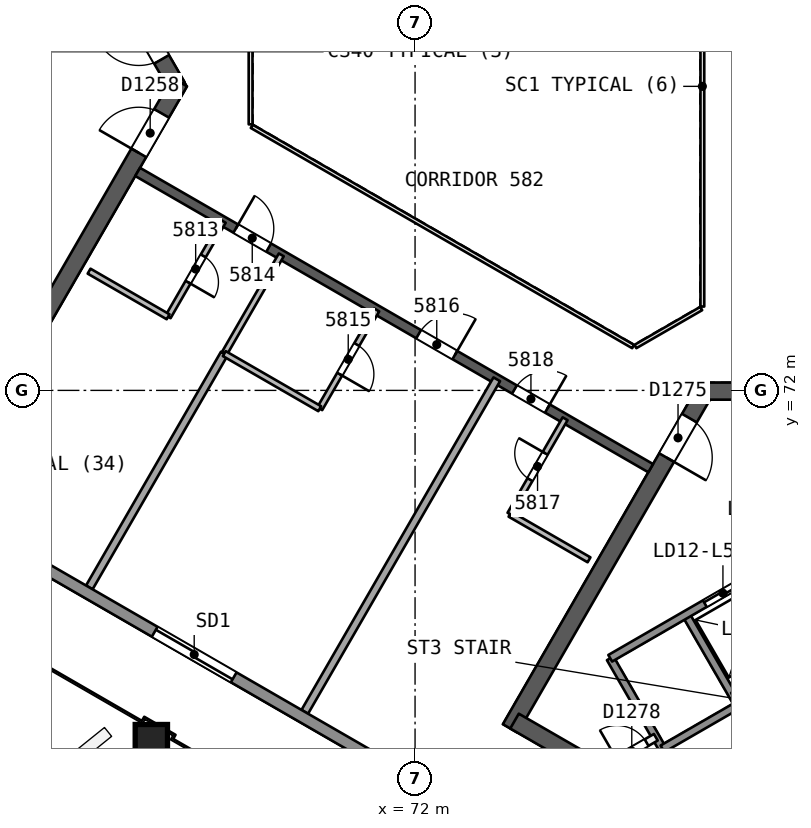
"""IFC4 building model, lengths in metres.
Left out: names, types, materials, properties, quantities, classifications, styles, units other than length and angle.
Written with IfcOpenShell. Run it as: python <this file> out.ifc"""

import sys

from ifc_helpers import new_model, si_unit, direction, frame, frame_2d, origin, origin_2d, place, context, subcontext, project, spatial, rectangle, extrude, element, fill, save


model = new_model("IFC4")
c1 = context("Model", 3, precision=1e-05, world=origin(), true_north=direction((0.0, 1.0)))
c2 = subcontext(c1, "Body", "Model", "MODEL_VIEW")
j1 = project(units=[si_unit("LENGTHUNIT", "METRE"), si_unit("PLANEANGLEUNIT", "RADIAN")], contexts=[c1])
p1 = place(None, origin())
s1 = spatial("IfcSite", under=j1, at=p1, CompositionType="ELEMENT")
p2 = place(p1, origin())
s2 = spatial("IfcBuilding", under=s1, at=p2, CompositionType="ELEMENT")
p3 = place(p2, frame((0.0, 0.0, 235.4)))
s3 = spatial("IfcBuildingStorey", under=s2, at=p3, CompositionType="ELEMENT", Elevation=235.4)
p4 = place(p3, frame((65.74, 80.0, 0.0), z_axis=(0.0, 0.0, 1.0), x_axis=(-0.499991857942, 0.866030104553, 0.0)))
e1 = element("IfcWall", 1, at=p4, inside=s3, PredefinedType="SHEAR", context=c2, shape_type="SweptSolid", body=[
    extrude(rectangle(XDim=10.25, YDim=0.45, at=frame_2d((5.125, 0.0))), origin(), (0.0, 0.0, 1.0), 3.7),
])
p5 = place(p4, frame((0.82, 0.0, 0.0)))
e2 = element("IfcOpeningElement", 2, at=p5, cuts=e1, PredefinedType="OPENING", context=c2, shape_type="SweptSolid", body=[
    extrude(rectangle(XDim=1.2, YDim=2.1, at=frame_2d((0.6, 1.05))), frame((0.0, 0.235, 0.0), z_axis=(0.0, -1.0, 0.0), x_axis=(1.0, 0.0, 0.0)), (0.0, 0.0, 1.0), 0.471),
])
p6 = place(p3, frame((60.728, 71.318, 0.0), z_axis=(0.0, 0.0, 1.0), x_axis=(0.500012416173, 0.866018235185, 0.0)))
e3 = element("IfcWall", 3, at=p6, inside=s3, PredefinedType="SHEAR", context=c2, shape_type="SweptSolid", body=[
    extrude(rectangle(XDim=10.155, YDim=0.45, at=frame_2d((5.078, 0.0))), origin(), (0.0, 0.0, 1.0), 3.7),
])
p7 = place(p6, frame((8.005, 0.0, 0.0)))
e4 = element("IfcOpeningElement", 4, at=p7, cuts=e3, PredefinedType="OPENING", context=c2, shape_type="SweptSolid", body=[
    extrude(rectangle(XDim=1.2, YDim=2.1, at=frame_2d((0.6, 1.05))), frame((0.0, 0.235, 0.0), z_axis=(0.0, -1.0, 0.0), x_axis=(1.0, 0.0, 0.0)), (0.0, 0.0, 1.0), 0.471),
])
p8 = place(p3, frame((79.63, 71.981, 0.0), z_axis=(0.0, 0.0, 1.0), x_axis=(-0.500002171595, -0.86602415001, 0.0)))
e5 = element("IfcWall", 5, at=p8, inside=s3, PredefinedType="SHEAR", context=c2, shape_type="SweptSolid", body=[
    extrude(rectangle(XDim=10.25, YDim=0.45, at=frame_2d((5.125, 0.0))), origin(), (0.0, 0.0, 1.0), 3.7),
])
p9 = place(p8, frame((0.82, 0.0, 0.0)))
e6 = element("IfcOpeningElement", 6, at=p9, cuts=e5, PredefinedType="OPENING", context=c2, shape_type="SweptSolid", body=[
    extrude(rectangle(XDim=1.2, YDim=2.1, at=frame_2d((0.6, 1.05))), frame((0.0, 0.235, 0.0), z_axis=(0.0, -1.0, 0.0), x_axis=(1.0, 0.0, 0.0)), (0.0, 0.0, 1.0), 0.471),
])
p10 = place(p3, frame((74.617, 63.299, 0.0), z_axis=(0.0, 0.0, 1.0), x_axis=(0.86602594008, -0.499999071108, 0.0)))
e7 = element("IfcWall", 7, at=p10, inside=s3, PredefinedType="SHEAR", context=c2, shape_type="SweptSolid", body=[
    extrude(rectangle(XDim=14.108, YDim=0.45, at=frame_2d((7.054, 0.0))), origin(), (0.0, 0.0, 1.0), 3.7),
])
p11 = place(p3, frame((89.655, 71.981, 0.0), z_axis=(0.0, 0.0, 1.0), x_axis=(-1.0, 0.0, 0.0)))
e8 = element("IfcWall", 8, at=p11, inside=s3, PredefinedType="SHEAR", context=c2, shape_type="SweptSolid", body=[
    extrude(rectangle(XDim=10.155, YDim=0.45, at=frame_2d((5.078, 0.0))), origin(), (0.0, 0.0, 1.0), 3.7),
])
p12 = place(p11, frame((8.005, 0.0, 0.0)))
e9 = element("IfcOpeningElement", 9, at=p12, cuts=e8, PredefinedType="OPENING", context=c2, shape_type="SweptSolid", body=[
    extrude(rectangle(XDim=1.2, YDim=2.1, at=frame_2d((0.6, 1.05))), frame((0.0, 0.235, 0.0), z_axis=(0.0, -1.0, 0.0), x_axis=(1.0, 0.0, 0.0)), (0.0, 0.0, 1.0), 0.471),
])
p13 = place(p3, frame((64.7, 77.748, 0.0), z_axis=(0.0, 0.0, 1.0), x_axis=(0.866026492143, -0.499998114903, 0.0)))
e10 = element("IfcWall", 10, at=p13, inside=s3, PredefinedType="SHEAR", context=c2, shape_type="SweptSolid", body=[
    extrude(rectangle(XDim=15.588, YDim=0.25, at=frame_2d((7.794, 0.0))), origin(), (0.0, 0.0, 1.0), 3.3),
])
p14 = place(p13, frame((2.982, 0.0, 0.0)))
e11 = element("IfcOpeningElement", 11, at=p14, cuts=e10, PredefinedType="OPENING", context=c2, shape_type="SweptSolid", body=[
    extrude(rectangle(XDim=1.0, YDim=2.1, at=frame_2d((0.5, 1.05))), frame((0.0, 0.135, 0.0), z_axis=(0.0, -1.0, 0.0), x_axis=(1.0, 0.0, 0.0)), (0.0, 0.0, 1.0), 0.271),
])
p15 = place(p13, frame((8.538, 0.0, 0.0)))
e12 = element("IfcOpeningElement", 12, at=p15, cuts=e10, PredefinedType="OPENING", context=c2, shape_type="SweptSolid", body=[
    extrude(rectangle(XDim=1.1, YDim=2.1, at=frame_2d((0.55, 1.05))), frame((0.0, 0.135, 0.0), z_axis=(0.0, -1.0, 0.0), x_axis=(1.0, 0.0, 0.0)), (0.0, 0.0, 1.0), 0.271),
])
p16 = place(p13, frame((11.45, 0.0, 0.0)))
e13 = element("IfcOpeningElement", 13, at=p16, cuts=e10, PredefinedType="OPENING", context=c2, shape_type="SweptSolid", body=[
    extrude(rectangle(XDim=1.0, YDim=2.1, at=frame_2d((0.5, 1.05))), frame((0.0, 0.135, 0.0), z_axis=(0.0, -1.0, 0.0), x_axis=(1.0, 0.0, 0.0)), (0.0, 0.0, 1.0), 0.271),
])
p17 = place(p3, frame((65.048, 62.763, 0.0), z_axis=(0.010092954999, 0.017481261926, 0.999796248113), x_axis=(-0.866025993948, 0.499998977805, 1.48321e-07)))
e14 = element("IfcColumn", 14, at=p17, inside=s3, PredefinedType="COLUMN", context=c2, shape_type="SweptSolid", body=[
    extrude(rectangle(XDim=0.85, YDim=0.85, at=origin_2d()), origin(), (0.0, 0.0, 1.0), 3.701),
])
p18 = place(p3, frame((66.952, 76.448, 0.0), z_axis=(0.0, 0.0, 1.0), x_axis=(-0.499987231761, -0.866032775405, 0.0)))
e15 = element("IfcWall", 15, at=p18, inside=s3, PredefinedType="PARTITIONING", context=c2, shape_type="SweptSolid", body=[
    extrude(rectangle(XDim=2.9, YDim=0.15, at=frame_2d((1.45, 0.0))), origin(), (0.0, 0.0, 1.0), 3.3),
])
p19 = place(p18, frame((1.05, 0.0, 0.0)))
e16 = element("IfcOpeningElement", 16, at=p19, cuts=e15, PredefinedType="OPENING", context=c2, shape_type="SweptSolid", body=[
    extrude(rectangle(XDim=0.8, YDim=2.1, at=frame_2d((0.4, 1.05))), frame((0.0, 0.085, 0.0), z_axis=(0.0, -1.0, 0.0), x_axis=(1.0, 0.0, 0.0)), (0.0, 0.0, 1.0), 0.171),
])
p20 = place(p3, frame((65.502, 73.937, 0.0), z_axis=(0.0, 0.0, 1.0), x_axis=(-0.865994240961, 0.500053971709, 0.0)))
e17 = element("IfcWall", 17, at=p20, inside=s3, PredefinedType="PARTITIONING", context=c2, shape_type="SweptSolid", body=[
    extrude(rectangle(XDim=2.401, YDim=0.15, at=frame_2d((1.201, 0.0))), origin(), (0.0, 0.0, 1.0), 3.3),
])
p21 = place(p3, frame((63.428, 66.815, 0.0), z_axis=(0.0, 0.0, 1.0), x_axis=(0.499994154718, 0.866028778533, 0.0)))
e18 = element("IfcWall", 18, at=p21, inside=s3, PredefinedType="PARTITIONING", context=c2, shape_type="SweptSolid", body=[
    extrude(rectangle(XDim=7.104, YDim=0.2, at=frame_2d((3.552, 0.0))), origin(), (0.0, 0.0, 1.0), 3.3),
])
p22 = place(p3, frame((66.98, 72.968, 0.0), z_axis=(0.0, 0.0, 1.0), x_axis=(0.499990139034, 0.866031096941, 0.0)))
e19 = element("IfcWall", 19, at=p22, inside=s3, PredefinedType="PARTITIONING", context=c2, shape_type="SweptSolid", body=[
    extrude(rectangle(XDim=3.0, YDim=0.15, at=frame_2d((1.5, 0.0))), origin(), (0.0, 0.0, 1.0), 3.3),
])
p23 = place(p3, frame((70.991, 74.116, 0.0), z_axis=(0.0, 0.0, 1.0), x_axis=(-0.499990139034, -0.866031096941, 0.0)))
e20 = element("IfcWall", 20, at=p23, inside=s3, PredefinedType="PARTITIONING", context=c2, shape_type="SweptSolid", body=[
    extrude(rectangle(XDim=3.0, YDim=0.15, at=frame_2d((1.5, 0.0))), origin(), (0.0, 0.0, 1.0), 3.3),
])
p24 = place(p23, frame((1.05, 0.0, 0.0)))
e21 = element("IfcOpeningElement", 21, at=p24, cuts=e20, PredefinedType="OPENING", context=c2, shape_type="SweptSolid", body=[
    extrude(rectangle(XDim=0.9, YDim=2.1, at=frame_2d((0.45, 1.05))), frame((0.0, 0.085, 0.0), z_axis=(0.0, -1.0, 0.0), x_axis=(1.0, 0.0, 0.0)), (0.0, 0.0, 1.0), 0.171),
])
p25 = place(p3, frame((69.491, 71.518, 0.0), z_axis=(0.0, 0.0, 1.0), x_axis=(-0.866032775405, 0.499987231761, 0.0)))
e22 = element("IfcWall", 22, at=p25, inside=s3, PredefinedType="PARTITIONING", context=c2, shape_type="SweptSolid", body=[
    extrude(rectangle(XDim=2.9, YDim=0.15, at=frame_2d((1.45, 0.0))), origin(), (0.0, 0.0, 1.0), 3.3),
])
p26 = place(p3, frame((69.098, 63.542, 0.0), z_axis=(0.0, 0.0, 1.0), x_axis=(0.499992962407, 0.866029466902, 0.0)))
e23 = element("IfcWall", 23, at=p26, inside=s3, PredefinedType="PARTITIONING", context=c2, shape_type="SweptSolid", body=[
    extrude(rectangle(XDim=10.104, YDim=0.2, at=frame_2d((5.052, 0.0))), origin(), (0.0, 0.0, 1.0), 3.3),
])
p27 = place(p3, frame((76.578, 67.542, 0.0), z_axis=(0.0, 0.0, 1.0), x_axis=(-0.866038271014, 0.499977712642, 0.0)))
e24 = element("IfcWall", 24, at=p27, inside=s3, PredefinedType="PARTITIONING", context=c2, shape_type="SweptSolid", body=[
    extrude(rectangle(XDim=2.401, YDim=0.15, at=frame_2d((1.2, 0.0))), origin(), (0.0, 0.0, 1.0), 3.3),
])
p28 = place(p3, frame((74.498, 68.743, 0.0), z_axis=(0.0, 0.0, 1.0), x_axis=(0.499987231761, 0.866032775405, 0.0)))
e25 = element("IfcWall", 25, at=p28, inside=s3, PredefinedType="PARTITIONING", context=c2, shape_type="SweptSolid", body=[
    extrude(rectangle(XDim=2.9, YDim=0.15, at=frame_2d((1.45, 0.0))), origin(), (0.0, 0.0, 1.0), 3.3),
])
p29 = place(p28, frame((1.05, 0.0, 0.0)))
e26 = element("IfcOpeningElement", 26, at=p29, cuts=e25, PredefinedType="OPENING", context=c2, shape_type="SweptSolid", body=[
    extrude(rectangle(XDim=0.8, YDim=2.1, at=frame_2d((0.4, 1.05))), frame((0.0, 0.085, 0.0), z_axis=(0.0, -1.0, 0.0), x_axis=(1.0, 0.0, 0.0)), (0.0, 0.0, 1.0), 0.171),
])
p30 = place(p3, frame((87.932, 52.496, 0.0), z_axis=(0.0, 0.0, 1.0), x_axis=(-0.866025334516, 0.500000119977, 0.0)))
e27 = element("IfcWall", 27, at=p30, inside=s3, PredefinedType="SOLIDWALL", context=c2, shape_type="SweptSolid", body=[
    extrude(rectangle(XDim=49.903, YDim=0.3, at=frame_2d((24.952, 0.0))), origin(), (0.0, 0.0, 1.0), 3.3),
])
p31 = place(p30, frame((23.907, 0.0, 0.0)))
e28 = element("IfcOpeningElement", 28, at=p31, cuts=e27, PredefinedType="OPENING", context=c2, shape_type="SweptSolid", body=[
    extrude(rectangle(XDim=2.4, YDim=2.4, at=frame_2d((1.2, 1.2))), frame((0.0, 0.161, 0.0), z_axis=(0.0, -1.0, 0.0), x_axis=(1.0, 0.0, 0.0)), (0.0, 0.0, 1.0), 0.321),
])
p32 = place(p30, frame((37.985, 0.0, 0.0)))
e29 = element("IfcOpeningElement", 29, at=p32, cuts=e27, PredefinedType="OPENING", context=c2, shape_type="SweptSolid", body=[
    extrude(rectangle(XDim=2.4, YDim=2.4, at=frame_2d((1.2, 1.2))), frame((0.0, 0.161, 0.0), z_axis=(0.0, -1.0, 0.0), x_axis=(1.0, 0.0, 0.0)), (0.0, 0.0, 1.0), 0.321),
])
p33 = place(p30, frame((9.674, 0.0, 0.0)))
e30 = element("IfcOpeningElement", 30, at=p33, cuts=e27, PredefinedType="OPENING", context=c2, shape_type="SweptSolid", body=[
    extrude(rectangle(XDim=2.4, YDim=2.4, at=frame_2d((1.2, 1.2))), frame((0.0, 0.161, 0.0), z_axis=(0.0, -1.0, 0.0), x_axis=(1.0, 0.0, 0.0)), (0.0, 0.0, 1.0), 0.321),
])
for number, where, z_axis, x_axis in (
    (31, (77.135, 64.952, 0.0), (0.0, 0.0, 1.0), (0.5, -0.866, 0.0)),
    (32, (79.127, 66.102, 0.0), (0.0, 0.0, 1.0), (0.5, -0.866, 0.0)),
):
    element("IfcWall", number, at=place(p3, frame(where, z_axis=z_axis, x_axis=x_axis)), inside=s3, PredefinedType="SOLIDWALL", context=c2, shape_type="SweptSolid", body=[
        extrude(rectangle(XDim=2.75, YDim=0.2, at=frame_2d((1.375, 0.0))), origin(), (0.0, 0.0, 1.0), 3.3),
    ])
p34 = place(p3, frame((77.135, 64.952, 0.0), z_axis=(0.0, 0.0, 1.0), x_axis=(0.866031916153, 0.499988720078, 0.0)))
e33 = element("IfcWall", 33, at=p34, inside=s3, PredefinedType="SOLIDWALL", context=c2, shape_type="SweptSolid", body=[
    extrude(rectangle(XDim=11.35, YDim=0.2, at=frame_2d((5.675, 0.0))), origin(), (0.0, 0.0, 1.0), 3.3),
])
p35 = place(p34, frame((2.875, 0.0, 0.0)))
e34 = element("IfcOpeningElement", 34, at=p35, cuts=e33, PredefinedType="OPENING", context=c2, shape_type="SweptSolid", body=[
    extrude(rectangle(XDim=1.1, YDim=2.1, at=frame_2d((0.55, 1.05))), frame((0.0, 0.11, 0.0), z_axis=(0.0, -1.0, 0.0), x_axis=(1.0, 0.0, 0.0)), (0.0, 0.0, 1.0), 0.221),
])
p36 = place(p34, frame((5.125, 0.0, 0.0)))
e35 = element("IfcOpeningElement", 35, at=p36, cuts=e33, PredefinedType="OPENING", context=c2, shape_type="SweptSolid", body=[
    extrude(rectangle(XDim=1.1, YDim=2.1, at=frame_2d((0.55, 1.05))), frame((0.0, 0.11, 0.0), z_axis=(0.0, -1.0, 0.0), x_axis=(1.0, 0.0, 0.0)), (0.0, 0.0, 1.0), 0.221),
])
p37 = place(p34, frame((7.375, 0.0, 0.0)))
e36 = element("IfcOpeningElement", 36, at=p37, cuts=e33, PredefinedType="OPENING", context=c2, shape_type="SweptSolid", body=[
    extrude(rectangle(XDim=1.1, YDim=2.1, at=frame_2d((0.55, 1.05))), frame((0.0, 0.11, 0.0), z_axis=(0.0, -1.0, 0.0), x_axis=(1.0, 0.0, 0.0)), (0.0, 0.0, 1.0), 0.221),
])
p38 = place(p3, frame((77.07, 62.143, 0.0), z_axis=(0.0, 0.0, 1.0), x_axis=(0.866013036001, 0.500021421018, 0.0)))
e37 = element("IfcWall", 37, at=p38, inside=s3, PredefinedType="PARTITIONING", context=c2, shape_type="SweptSolid", body=[
    extrude(rectangle(XDim=1.461, YDim=0.2, at=frame_2d((0.73, 0.0))), origin(), (0.0, 0.0, 1.0), 3.3),
])
p39 = place(p38, frame((0.281, 0.0, 0.0)))
e38 = element("IfcOpeningElement", 38, at=p39, cuts=e37, PredefinedType="OPENING", context=c2, shape_type="SweptSolid", body=[
    extrude(rectangle(XDim=0.9, YDim=2.1, at=frame_2d((0.45, 1.05))), frame((0.0, 0.11, 0.0), z_axis=(0.0, -1.0, 0.0), x_axis=(1.0, 0.0, 0.0)), (0.0, 0.0, 1.0), 0.221),
])
p40 = place(p3, frame((80.367, 63.954, 0.0), z_axis=(0.0, 0.0, 1.0), x_axis=(0.866026575979, 0.499997969693, 0.0)))
e39 = element("IfcWall", 39, at=p40, inside=s3, PredefinedType="SOLIDWALL", context=c2, shape_type="SweptSolid", body=[
    extrude(rectangle(XDim=6.75, YDim=0.2, at=frame_2d((3.375, 0.0))), origin(), (0.0, 0.0, 1.0), 3.3),
])
p41 = place(p3, frame((78.51, 62.57, 0.0), z_axis=(0.0, 0.0, 1.0), x_axis=(0.866053019151, 0.499952165731, 0.0)))
e40 = element("IfcWall", 40, at=p41, inside=s3, PredefinedType="SOLIDWALL", context=c2, shape_type="SweptSolid", body=[
    extrude(rectangle(XDim=2.3, YDim=0.2, at=frame_2d((1.15, 0.0))), origin(), (0.0, 0.0, 1.0), 3.3),
])
p42 = place(p3, frame((79.56, 74.206, 0.0), z_axis=(0.0, 0.0, 1.0), x_axis=(0.0, 1.0, 0.0)))
e41 = element("IfcWall", 41, at=p42, inside=s3, PredefinedType="PARTITIONING", context=c2, shape_type="SweptSolid", body=[
    extrude(rectangle(XDim=11.588, YDim=0.1, at=frame_2d((5.794, 0.0))), origin(), (0.0, 0.0, 1.0), 3.3),
])
p43 = place(p3, frame((67.672, 81.0, 0.0), z_axis=(0.0, 0.0, 1.0), x_axis=(0.0, -1.0, 0.0)))
e42 = element("IfcWall", 42, at=p43, inside=s3, PredefinedType="PARTITIONING", context=c2, shape_type="SweptSolid", body=[
    extrude(rectangle(XDim=2.0, YDim=0.1, at=frame_2d((1.0, 0.0))), origin(), (0.0, 0.0, 1.0), 3.3),
])
p44 = place(p3, frame((67.702, 78.948, 0.0), z_axis=(0.0, 0.0, 1.0), x_axis=(0.866026658274, -0.499997827154, 0.0)))
e43 = element("IfcWall", 43, at=p44, inside=s3, PredefinedType="PARTITIONING", context=c2, shape_type="SweptSolid", body=[
    extrude(rectangle(XDim=11.588, YDim=0.1, at=frame_2d((5.794, 0.0))), origin(), (0.0, 0.0, 1.0), 3.3),
])
p45 = place(p3, frame((77.798, 73.154, 0.0), z_axis=(0.0, 0.0, 1.0), x_axis=(0.866041268327, 0.499972520799, 0.0)))
e44 = element("IfcWall", 44, at=p45, inside=s3, PredefinedType="PARTITIONING", context=c2, shape_type="SweptSolid", body=[
    extrude(rectangle(XDim=2.0, YDim=0.1, at=frame_2d((1.0, 0.0))), origin(), (0.0, 0.0, 1.0), 3.3),
])
p46 = place(p19, origin())
e45 = element("IfcDoor", 45, at=p46, inside=s3, OperationType="SINGLE_SWING_RIGHT", PredefinedType="NOTDEFINED", context=c2, shape_type="SweptSolid", body=[
    extrude(rectangle(XDim=0.8, YDim=2.1, at=frame_2d((0.4, 1.05))), frame((0.0, 0.025, 0.0), z_axis=(0.0, -1.0, 0.0), x_axis=(1.0, 0.0, 0.0)), (0.0, 0.0, 1.0), 0.05),
])
fill(e16, e45)
p47 = place(p14, origin())
e46 = element("IfcDoor", 46, at=p47, inside=s3, OperationType="SINGLE_SWING_LEFT", PredefinedType="NOTDEFINED", context=c2, shape_type="SweptSolid", body=[
    extrude(rectangle(XDim=1.0, YDim=2.1, at=frame_2d((0.5, 1.05))), frame((0.0, 0.025, 0.0), z_axis=(0.0, -1.0, 0.0), x_axis=(1.0, 0.0, 0.0)), (0.0, 0.0, 1.0), 0.05),
])
fill(e11, e46)
p48 = place(p24, origin())
e47 = element("IfcDoor", 47, at=p48, inside=s3, OperationType="SINGLE_SWING_RIGHT", PredefinedType="NOTDEFINED", context=c2, shape_type="SweptSolid", body=[
    extrude(rectangle(XDim=0.9, YDim=2.1, at=frame_2d((0.45, 1.05))), frame((0.0, 0.025, 0.0), z_axis=(0.0, -1.0, 0.0), x_axis=(1.0, 0.0, 0.0)), (0.0, 0.0, 1.0), 0.05),
])
fill(e21, e47)
p49 = place(p15, origin())
e48 = element("IfcDoor", 48, at=p49, inside=s3, OperationType="SINGLE_SWING_RIGHT", PredefinedType="NOTDEFINED", context=c2, shape_type="SweptSolid", body=[
    extrude(rectangle(XDim=1.1, YDim=2.1, at=frame_2d((0.55, 1.05))), frame((0.0, 0.025, 0.0), z_axis=(0.0, -1.0, 0.0), x_axis=(1.0, 0.0, 0.0)), (0.0, 0.0, 1.0), 0.05),
])
fill(e12, e48)
p50 = place(p29, origin())
e49 = element("IfcDoor", 49, at=p50, inside=s3, OperationType="SINGLE_SWING_RIGHT", PredefinedType="NOTDEFINED", context=c2, shape_type="SweptSolid", body=[
    extrude(rectangle(XDim=0.8, YDim=2.1, at=frame_2d((0.4, 1.05))), frame((0.0, 0.025, 0.0), z_axis=(0.0, -1.0, 0.0), x_axis=(1.0, 0.0, 0.0)), (0.0, 0.0, 1.0), 0.05),
])
fill(e26, e49)
p51 = place(p16, origin())
e50 = element("IfcDoor", 50, at=p51, inside=s3, OperationType="SINGLE_SWING_RIGHT", PredefinedType="NOTDEFINED", context=c2, shape_type="SweptSolid", body=[
    extrude(rectangle(XDim=1.0, YDim=2.1, at=frame_2d((0.5, 1.05))), frame((0.0, 0.025, 0.0), z_axis=(0.0, -1.0, 0.0), x_axis=(1.0, 0.0, 0.0)), (0.0, 0.0, 1.0), 0.05),
])
fill(e13, e50)
p52 = place(p31, origin())
e51 = element("IfcDoor", 51, at=p52, inside=s3, OperationType="SLIDING_TO_LEFT", PredefinedType="NOTDEFINED", context=c2, shape_type="SweptSolid", body=[
    extrude(rectangle(XDim=2.4, YDim=2.4, at=frame_2d((1.2, 1.2))), frame((0.0, 0.025, 0.0), z_axis=(0.0, -1.0, 0.0), x_axis=(1.0, 0.0, 0.0)), (0.0, 0.0, 1.0), 0.05),
])
fill(e28, e51)
p53 = place(p5, origin())
e52 = element("IfcDoor", 52, at=p53, inside=s3, OperationType="SINGLE_SWING_RIGHT", PredefinedType="NOTDEFINED", context=c2, shape_type="SweptSolid", body=[
    extrude(rectangle(XDim=1.2, YDim=2.1, at=frame_2d((0.6, 1.05))), frame((0.0, 0.025, 0.0), z_axis=(0.0, -1.0, 0.0), x_axis=(1.0, 0.0, 0.0)), (0.0, 0.0, 1.0), 0.05),
])
fill(e2, e52)
p54 = place(p7, origin())
e53 = element("IfcDoor", 53, at=p54, inside=s3, OperationType="SINGLE_SWING_LEFT", PredefinedType="NOTDEFINED", context=c2, shape_type="SweptSolid", body=[
    extrude(rectangle(XDim=1.2, YDim=2.1, at=frame_2d((0.6, 1.05))), frame((0.0, 0.025, 0.0), z_axis=(0.0, -1.0, 0.0), x_axis=(1.0, 0.0, 0.0)), (0.0, 0.0, 1.0), 0.05),
])
fill(e4, e53)
p55 = place(p9, origin())
e54 = element("IfcDoor", 54, at=p55, inside=s3, OperationType="SINGLE_SWING_RIGHT", PredefinedType="NOTDEFINED", context=c2, shape_type="SweptSolid", body=[
    extrude(rectangle(XDim=1.2, YDim=2.1, at=frame_2d((0.6, 1.05))), frame((0.0, 0.025, 0.0), z_axis=(0.0, -1.0, 0.0), x_axis=(1.0, 0.0, 0.0)), (0.0, 0.0, 1.0), 0.05),
])
fill(e6, e54)
p56 = place(p35, origin())
e55 = element("IfcDoor", 55, at=p56, inside=s3, OperationType="SLIDING_TO_LEFT", PredefinedType="NOTDEFINED", context=c2, shape_type="SweptSolid", body=[
    extrude(rectangle(XDim=1.1, YDim=2.1, at=frame_2d((0.55, 1.05))), frame((0.0, 0.025, 0.0), z_axis=(0.0, -1.0, 0.0), x_axis=(1.0, 0.0, 0.0)), (0.0, 0.0, 1.0), 0.05),
])
fill(e34, e55)
p57 = place(p39, origin())
e56 = element("IfcDoor", 56, at=p57, inside=s3, OperationType="SINGLE_SWING_LEFT", PredefinedType="NOTDEFINED", context=c2, shape_type="SweptSolid", body=[
    extrude(rectangle(XDim=0.9, YDim=2.1, at=frame_2d((0.45, 1.05))), frame((0.0, 0.025, 0.0), z_axis=(0.0, -1.0, 0.0), x_axis=(1.0, 0.0, 0.0)), (0.0, 0.0, 1.0), 0.05),
])
fill(e38, e56)
save(model, sys.argv[1])
